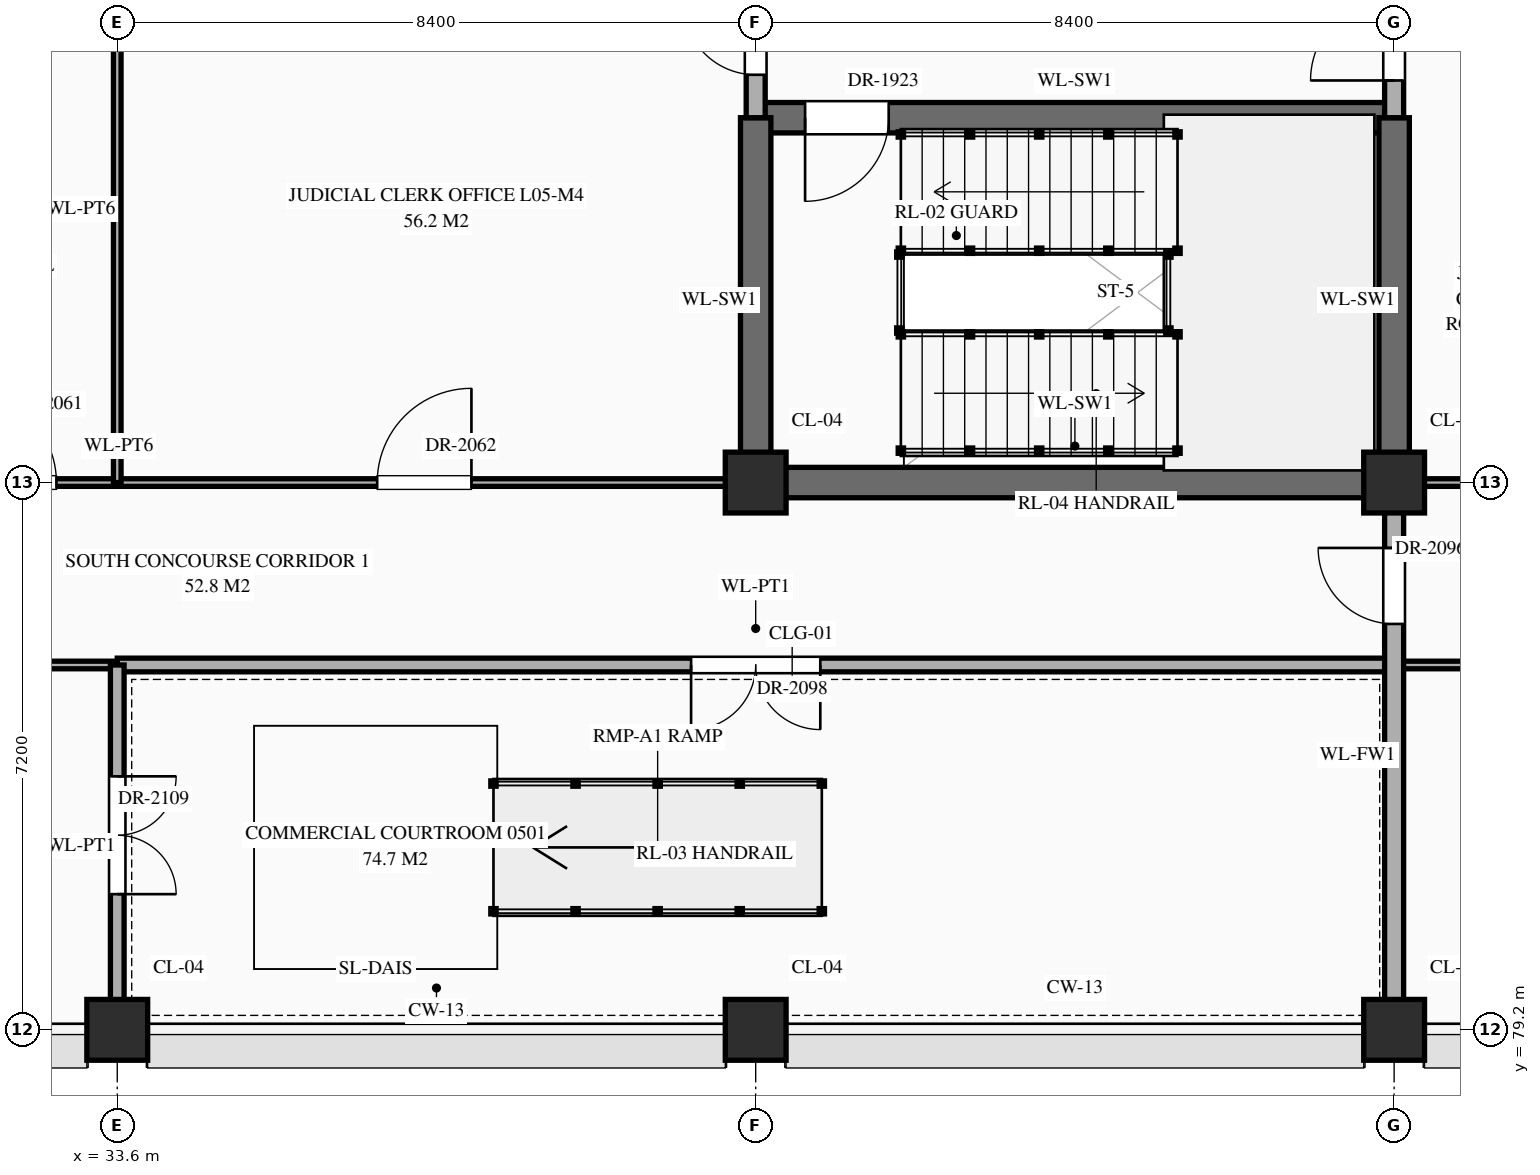
"""IFC4 building model, lengths in metres.
Left out: names, types, materials, properties, quantities, classifications, styles, units other than length and angle.
Written with IfcOpenShell. Run it as: python <this file> out.ifc"""

import sys

from ifc_helpers import new_model, si_unit, direction, frame, frame_2d, origin, origin_2d, place, context, subcontext, project, spatial, rectangle, extrude, element, fill, save


model = new_model("IFC4")
c1 = context("Model", 3, precision=1e-05, world=origin(), true_north=direction((0.0, 1.0)))
c2 = subcontext(c1, "Body", "Model", "MODEL_VIEW")
j1 = project(units=[si_unit("LENGTHUNIT", "METRE"), si_unit("PLANEANGLEUNIT", "RADIAN")], contexts=[c1])
p1 = place(None, origin())
s1 = spatial("IfcSite", under=j1, at=p1, CompositionType="ELEMENT")
p2 = place(p1, origin())
s2 = spatial("IfcBuilding", under=s1, at=p2, CompositionType="ELEMENT")
p3 = place(p2, frame((0.0, 0.0, 21.6)))
s3 = spatial("IfcBuildingStorey", under=s2, at=p3, CompositionType="ELEMENT", Elevation=21.6)
for number, where, z_axis, x_axis in (
    (1, (33.6, 79.2, 0.0), (0.0, 0.0, 1.0), (1.0, 0.0, 0.0)),
    (2, (42.0, 79.2, 0.0), (0.0, 0.0, 1.0), (1.0, 0.0, 0.0)),
    (3, (42.0, 86.4, 0.0), (0.0, 0.0, 1.0), (1.0, 0.0, 0.0)),
    (4, (50.4, 79.2, 0.0), (0.0, 0.0, 1.0), (1.0, 0.0, 0.0)),
    (5, (50.4, 86.4, 0.0), (0.0, 0.0, 1.0), (1.0, 0.0, 0.0)),
):
    element("IfcColumn", number, at=place(p3, frame(where, z_axis=z_axis, x_axis=x_axis)), inside=s3, PredefinedType="COLUMN", context=c2, shape_type="SweptSolid", body=[
        extrude(rectangle(XDim=0.8, YDim=0.8, at=origin_2d()), origin(), (0.0, 0.0, 1.0), 4.5),
    ])
p4 = place(p3, frame((25.24, 84.0, 0.0), z_axis=(0.0, 0.0, 1.0), x_axis=(1.0, 0.0, 0.0)))
e6 = element("IfcWall", 6, at=p4, inside=s3, PredefinedType="STANDARD", context=c2, shape_type="SweptSolid", body=[
    extrude(rectangle(XDim=8.36, YDim=0.1, at=frame_2d((4.18, 0.0))), origin(), (0.0, 0.0, 1.0), 4.24),
])
p5 = place(p4, frame((3.405, 0.0, 0.0)))
e7 = element("IfcOpeningElement", 7, at=p5, cuts=e6, PredefinedType="OPENING", context=c2, shape_type="SweptSolid", body=[
    extrude(rectangle(XDim=1.55, YDim=2.35, at=frame_2d((0.775, 1.175))), frame((0.0, 0.062, 0.0), z_axis=(0.0, -1.0, 0.0), x_axis=(1.0, 0.0, 0.0)), (0.0, 0.0, 1.0), 0.124),
])
p6 = place(p3, frame((33.6, 84.0, 0.0), z_axis=(0.0, 0.0, 1.0), x_axis=(1.0, 0.0, 0.0)))
e8 = element("IfcWall", 8, at=p6, inside=s3, PredefinedType="STANDARD", context=c2, shape_type="SweptSolid", body=[
    extrude(rectangle(XDim=16.8, YDim=0.18, at=frame_2d((8.4, 0.0))), origin(), (0.0, 0.0, 1.0), 4.24),
])
p7 = place(p6, frame((7.55, 0.0, 0.0)))
e9 = element("IfcOpeningElement", 9, at=p7, cuts=e8, PredefinedType="OPENING", context=c2, shape_type="SweptSolid", body=[
    extrude(rectangle(XDim=1.7, YDim=2.45, at=frame_2d((0.85, 1.225))), frame((0.0, 0.102, 0.0), z_axis=(0.0, -1.0, 0.0), x_axis=(1.0, 0.0, 0.0)), (0.0, 0.0, 1.0), 0.204),
])
p8 = place(p3, frame((50.4, 84.0, 0.0), z_axis=(0.0, 0.0, 1.0), x_axis=(1.0, 0.0, 0.0)))
e10 = element("IfcWall", 10, at=p8, inside=s3, PredefinedType="STANDARD", context=c2, shape_type="SweptSolid", body=[
    extrude(rectangle(XDim=16.8, YDim=0.1, at=frame_2d((8.4, 0.0))), origin(), (0.0, 0.0, 1.0), 4.24),
])
p9 = place(p8, frame((3.69, 0.0, 0.0)))
e11 = element("IfcOpeningElement", 11, at=p9, cuts=e10, PredefinedType="OPENING", context=c2, shape_type="SweptSolid", body=[
    extrude(rectangle(XDim=1.02, YDim=2.4, at=frame_2d((0.51, 1.2))), frame((0.0, 0.062, 0.0), z_axis=(0.0, -1.0, 0.0), x_axis=(1.0, 0.0, 0.0)), (0.0, 0.0, 1.0), 0.124),
])
p10 = place(p8, frame((12.07, 0.0, 0.0)))
e12 = element("IfcOpeningElement", 12, at=p10, cuts=e10, PredefinedType="OPENING", context=c2, shape_type="SweptSolid", body=[
    extrude(rectangle(XDim=1.06, YDim=2.4, at=frame_2d((0.53, 1.2))), frame((0.0, 0.062, 0.0), z_axis=(0.0, -1.0, 0.0), x_axis=(1.0, 0.0, 0.0)), (0.0, 0.0, 1.0), 0.124),
])
p11 = place(p3, frame((25.24, 86.4, 0.0), z_axis=(0.0, 0.0, 1.0), x_axis=(1.0, 0.0, 0.0)))
e13 = element("IfcWall", 13, at=p11, inside=s3, PredefinedType="STANDARD", context=c2, shape_type="SweptSolid", body=[
    extrude(rectangle(XDim=16.76, YDim=0.1, at=frame_2d((8.38, 0.0))), origin(), (0.0, 0.0, 1.0), 3.19),
])
p12 = place(p11, frame((0.98, 0.0, 0.0)))
e14 = element("IfcOpeningElement", 14, at=p12, cuts=e13, PredefinedType="OPENING", context=c2, shape_type="SweptSolid", body=[
    extrude(rectangle(XDim=1.08, YDim=2.25, at=frame_2d((0.54, 1.125))), frame((0.0, 0.062, 0.0), z_axis=(0.0, -1.0, 0.0), x_axis=(1.0, 0.0, 0.0)), (0.0, 0.0, 1.0), 0.124),
])
p13 = place(p11, frame((3.335, 0.0, 0.0)))
e15 = element("IfcOpeningElement", 15, at=p13, cuts=e13, PredefinedType="OPENING", context=c2, shape_type="SweptSolid", body=[
    extrude(rectangle(XDim=1.65, YDim=2.4, at=frame_2d((0.825, 1.2))), frame((0.0, 0.062, 0.0), z_axis=(0.0, -1.0, 0.0), x_axis=(1.0, 0.0, 0.0)), (0.0, 0.0, 1.0), 0.124),
])
p14 = place(p11, frame((6.36, 0.0, 0.0)))
e16 = element("IfcOpeningElement", 16, at=p14, cuts=e13, PredefinedType="OPENING", context=c2, shape_type="SweptSolid", body=[
    extrude(rectangle(XDim=1.2, YDim=2.35, at=frame_2d((0.6, 1.175))), frame((0.0, 0.062, 0.0), z_axis=(0.0, -1.0, 0.0), x_axis=(1.0, 0.0, 0.0)), (0.0, 0.0, 1.0), 0.124),
])
p15 = place(p11, frame((11.78, 0.0, 0.0)))
e17 = element("IfcOpeningElement", 17, at=p15, cuts=e13, PredefinedType="OPENING", context=c2, shape_type="SweptSolid", body=[
    extrude(rectangle(XDim=1.24, YDim=2.3, at=frame_2d((0.62, 1.15))), frame((0.0, 0.062, 0.0), z_axis=(0.0, -1.0, 0.0), x_axis=(1.0, 0.0, 0.0)), (0.0, 0.0, 1.0), 0.124),
])
p16 = place(p3, frame((42.0, 86.4, 0.0), z_axis=(0.0, 0.0, 1.0), x_axis=(1.0, 0.0, 0.0)))
e18 = element("IfcWall", 18, at=p16, inside=s3, PredefinedType="SHEAR", context=c2, shape_type="SweptSolid", body=[
    extrude(rectangle(XDim=8.4, YDim=0.4, at=frame_2d((4.2, 0.0))), origin(), (0.0, 0.0, 1.0), 4.24),
])
p17 = place(p3, frame((50.4, 86.4, 0.0), z_axis=(0.0, 0.0, 1.0), x_axis=(1.0, 0.0, 0.0)))
e19 = element("IfcWall", 19, at=p17, inside=s3, PredefinedType="STANDARD", context=c2, shape_type="SweptSolid", body=[
    extrude(rectangle(XDim=8.4, YDim=0.1, at=frame_2d((4.2, 0.0))), origin(), (0.0, 0.0, 1.0), 3.39),
])
p18 = place(p17, frame((1.09, 0.0, 0.0)))
e20 = element("IfcOpeningElement", 20, at=p18, cuts=e19, PredefinedType="OPENING", context=c2, shape_type="SweptSolid", body=[
    extrude(rectangle(XDim=0.94, YDim=2.3, at=frame_2d((0.47, 1.15))), frame((0.0, 0.062, 0.0), z_axis=(0.0, -1.0, 0.0), x_axis=(1.0, 0.0, 0.0)), (0.0, 0.0, 1.0), 0.124),
])
p19 = place(p17, frame((3.69, 0.0, 0.0)))
e21 = element("IfcOpeningElement", 21, at=p19, cuts=e19, PredefinedType="OPENING", context=c2, shape_type="SweptSolid", body=[
    extrude(rectangle(XDim=1.02, YDim=2.4, at=frame_2d((0.51, 1.2))), frame((0.0, 0.062, 0.0), z_axis=(0.0, -1.0, 0.0), x_axis=(1.0, 0.0, 0.0)), (0.0, 0.0, 1.0), 0.124),
])
p20 = place(p17, frame((6.31, 0.0, 0.0)))
e22 = element("IfcOpeningElement", 22, at=p20, cuts=e19, PredefinedType="OPENING", context=c2, shape_type="SweptSolid", body=[
    extrude(rectangle(XDim=1.06, YDim=2.4, at=frame_2d((0.53, 1.2))), frame((0.0, 0.062, 0.0), z_axis=(0.0, -1.0, 0.0), x_axis=(1.0, 0.0, 0.0)), (0.0, 0.0, 1.0), 0.124),
])
p21 = place(p3, frame((42.0, 91.2, 0.0), z_axis=(0.0, 0.0, 1.0), x_axis=(1.0, 0.0, 0.0)))
e23 = element("IfcWall", 23, at=p21, inside=s3, PredefinedType="SHEAR", context=c2, shape_type="SweptSolid", body=[
    extrude(rectangle(XDim=8.4, YDim=0.4, at=frame_2d((4.2, 0.0))), origin(), (0.0, 0.0, 1.0), 4.24),
])
p22 = place(p21, frame((0.65, 0.0, 0.0)))
e24 = element("IfcOpeningElement", 24, at=p22, cuts=e23, PredefinedType="OPENING", context=c2, shape_type="SweptSolid", body=[
    extrude(rectangle(XDim=1.1, YDim=2.2, at=frame_2d((0.55, 1.1))), frame((0.0, 0.212, 0.0), z_axis=(0.0, -1.0, 0.0), x_axis=(1.0, 0.0, 0.0)), (0.0, 0.0, 1.0), 0.424),
])
p23 = place(p3, frame((33.6, 79.24, 0.0), z_axis=(0.0, 0.0, 1.0), x_axis=(0.0, 1.0, 0.0)))
e25 = element("IfcWall", 25, at=p23, inside=s3, PredefinedType="STANDARD", context=c2, shape_type="SweptSolid", body=[
    extrude(rectangle(XDim=4.76, YDim=0.18, at=frame_2d((2.38, 0.0))), origin(), (0.0, 0.0, 1.0), 4.24),
])
p24 = place(p23, frame((1.745, 0.0, 0.0)))
e26 = element("IfcOpeningElement", 26, at=p24, cuts=e25, PredefinedType="OPENING", context=c2, shape_type="SweptSolid", body=[
    extrude(rectangle(XDim=1.55, YDim=2.35, at=frame_2d((0.775, 1.175))), frame((0.0, 0.102, 0.0), z_axis=(0.0, -1.0, 0.0), x_axis=(1.0, 0.0, 0.0)), (0.0, 0.0, 1.0), 0.204),
])
p25 = place(p3, frame((33.6, 86.4, 0.0), z_axis=(0.0, 0.0, 1.0), x_axis=(0.0, 1.0, 0.0)))
e27 = element("IfcWall", 27, at=p25, inside=s3, PredefinedType="STANDARD", context=c2, shape_type="SweptSolid", body=[
    extrude(rectangle(XDim=7.2, YDim=0.1, at=frame_2d((3.6, 0.0))), origin(), (0.0, 0.0, 1.0), 4.24),
])
p26 = place(p3, frame((42.0, 86.4, 0.0), z_axis=(0.0, 0.0, 1.0), x_axis=(0.0, 1.0, 0.0)))
e28 = element("IfcWall", 28, at=p26, inside=s3, PredefinedType="SHEAR", context=c2, shape_type="SweptSolid", body=[
    extrude(rectangle(XDim=4.8, YDim=0.4, at=frame_2d((2.4, 0.0))), origin(), (0.0, 0.0, 1.0), 4.24),
])
p27 = place(p3, frame((42.0, 91.2, 0.0), z_axis=(0.0, 0.0, 1.0), x_axis=(0.0, 1.0, 0.0)))
e29 = element("IfcWall", 29, at=p27, inside=s3, PredefinedType="STANDARD", context=c2, shape_type="SweptSolid", body=[
    extrude(rectangle(XDim=2.4, YDim=0.25, at=frame_2d((1.2, 0.0))), origin(), (0.0, 0.0, 1.0), 3.49),
])
p28 = place(p27, frame((0.565, 0.0, 0.0)))
e30 = element("IfcOpeningElement", 30, at=p28, cuts=e29, PredefinedType="OPENING", context=c2, shape_type="SweptSolid", body=[
    extrude(rectangle(XDim=0.95, YDim=2.15, at=frame_2d((0.475, 1.075))), frame((0.0, 0.137, 0.0), z_axis=(0.0, -1.0, 0.0), x_axis=(1.0, 0.0, 0.0)), (0.0, 0.0, 1.0), 0.274),
])
p29 = place(p3, frame((50.4, 79.24, 0.0), z_axis=(0.0, 0.0, 1.0), x_axis=(0.0, 1.0, 0.0)))
e31 = element("IfcWall", 31, at=p29, inside=s3, PredefinedType="STANDARD", context=c2, shape_type="SweptSolid", body=[
    extrude(rectangle(XDim=7.16, YDim=0.25, at=frame_2d((3.58, 0.0))), origin(), (0.0, 0.0, 1.0), 3.49),
])
p30 = place(p29, frame((5.3, 0.0, 0.0)))
e32 = element("IfcOpeningElement", 32, at=p30, cuts=e31, PredefinedType="OPENING", context=c2, shape_type="SweptSolid", body=[
    extrude(rectangle(XDim=1.0, YDim=2.2, at=frame_2d((0.5, 1.1))), frame((0.0, 0.137, 0.0), z_axis=(0.0, -1.0, 0.0), x_axis=(1.0, 0.0, 0.0)), (0.0, 0.0, 1.0), 0.274),
])
p31 = place(p3, frame((50.4, 86.4, 0.0), z_axis=(0.0, 0.0, 1.0), x_axis=(0.0, 1.0, 0.0)))
e33 = element("IfcWall", 33, at=p31, inside=s3, PredefinedType="SHEAR", context=c2, shape_type="SweptSolid", body=[
    extrude(rectangle(XDim=4.8, YDim=0.4, at=frame_2d((2.4, 0.0))), origin(), (0.0, 0.0, 1.0), 4.24),
])
p32 = place(p3, frame((50.4, 91.2, 0.0), z_axis=(0.0, 0.0, 1.0), x_axis=(0.0, 1.0, 0.0)))
e34 = element("IfcWall", 34, at=p32, inside=s3, PredefinedType="STANDARD", context=c2, shape_type="SweptSolid", body=[
    extrude(rectangle(XDim=13.2, YDim=0.25, at=frame_2d((6.6, 0.0))), origin(), (0.0, 0.0, 1.0), 3.49),
])
p33 = place(p32, frame((0.49, 0.0, 0.0)))
e35 = element("IfcOpeningElement", 35, at=p33, cuts=e34, PredefinedType="OPENING", context=c2, shape_type="SweptSolid", body=[
    extrude(rectangle(XDim=1.1, YDim=2.2, at=frame_2d((0.55, 1.1))), frame((0.0, 0.137, 0.0), z_axis=(0.0, -1.0, 0.0), x_axis=(1.0, 0.0, 0.0)), (0.0, 0.0, 1.0), 0.274),
])
p34 = place(p32, frame((10.485, 0.0, 0.0)))
e36 = element("IfcOpeningElement", 36, at=p34, cuts=e34, PredefinedType="OPENING", context=c2, shape_type="SweptSolid", body=[
    extrude(rectangle(XDim=0.95, YDim=2.15, at=frame_2d((0.475, 1.075))), frame((0.0, 0.137, 0.0), z_axis=(0.0, -1.0, 0.0), x_axis=(1.0, 0.0, 0.0)), (0.0, 0.0, 1.0), 0.274),
])
p35 = place(p32, frame((3.26, 0.0, 0.0)))
e37 = element("IfcOpeningElement", 37, at=p35, cuts=e34, PredefinedType="OPENING", context=c2, shape_type="SweptSolid", body=[
    extrude(rectangle(XDim=1.0, YDim=2.2, at=frame_2d((0.5, 1.1))), frame((0.0, 0.137, 0.0), z_axis=(0.0, -1.0, 0.0), x_axis=(1.0, 0.0, 0.0)), (0.0, 0.0, 1.0), 0.274),
])
p36 = place(p22, frame((1.1, 0.0, 0.0), z_axis=(0.0, 0.0, 1.0), x_axis=(-1.0, 0.0, 0.0)))
e38 = element("IfcDoor", 38, at=p36, inside=s3, OperationType="SINGLE_SWING_RIGHT", PredefinedType="DOOR", context=c2, shape_type="SweptSolid", body=[
    extrude(rectangle(XDim=1.1, YDim=2.2, at=frame_2d((0.55, 1.1))), frame((0.0, 0.025, 0.0), z_axis=(0.0, -1.0, 0.0), x_axis=(1.0, 0.0, 0.0)), (0.0, 0.0, 1.0), 0.05),
])
fill(e24, e38)
p37 = place(p28, origin())
e39 = element("IfcDoor", 39, at=p37, inside=s3, OperationType="SINGLE_SWING_RIGHT", PredefinedType="DOOR", context=c2, shape_type="SweptSolid", body=[
    extrude(rectangle(XDim=0.95, YDim=2.15, at=frame_2d((0.475, 1.075))), frame((0.0, 0.025, 0.0), z_axis=(0.0, -1.0, 0.0), x_axis=(1.0, 0.0, 0.0)), (0.0, 0.0, 1.0), 0.05),
])
fill(e30, e39)
p38 = place(p33, origin())
e40 = element("IfcDoor", 40, at=p38, inside=s3, OperationType="SINGLE_SWING_LEFT", PredefinedType="DOOR", context=c2, shape_type="SweptSolid", body=[
    extrude(rectangle(XDim=1.1, YDim=2.2, at=frame_2d((0.55, 1.1))), frame((0.0, 0.025, 0.0), z_axis=(0.0, -1.0, 0.0), x_axis=(1.0, 0.0, 0.0)), (0.0, 0.0, 1.0), 0.05),
])
fill(e35, e40)
p39 = place(p14, origin())
e41 = element("IfcDoor", 41, at=p39, inside=s3, OperationType="SINGLE_SWING_LEFT", PredefinedType="DOOR", context=c2, shape_type="SweptSolid", body=[
    extrude(rectangle(XDim=1.2, YDim=2.35, at=frame_2d((0.6, 1.175))), frame((0.0, 0.025, 0.0), z_axis=(0.0, -1.0, 0.0), x_axis=(1.0, 0.0, 0.0)), (0.0, 0.0, 1.0), 0.05),
])
fill(e16, e41)
p40 = place(p15, origin())
e42 = element("IfcDoor", 42, at=p40, inside=s3, OperationType="SINGLE_SWING_RIGHT", PredefinedType="DOOR", context=c2, shape_type="SweptSolid", body=[
    extrude(rectangle(XDim=1.24, YDim=2.3, at=frame_2d((0.62, 1.15))), frame((0.0, 0.025, 0.0), z_axis=(0.0, -1.0, 0.0), x_axis=(1.0, 0.0, 0.0)), (0.0, 0.0, 1.0), 0.05),
])
fill(e17, e42)
p41 = place(p30, origin())
e43 = element("IfcDoor", 43, at=p41, inside=s3, OperationType="SINGLE_SWING_RIGHT", PredefinedType="DOOR", context=c2, shape_type="SweptSolid", body=[
    extrude(rectangle(XDim=1.0, YDim=2.2, at=frame_2d((0.5, 1.1))), frame((0.0, 0.025, 0.0), z_axis=(0.0, -1.0, 0.0), x_axis=(1.0, 0.0, 0.0)), (0.0, 0.0, 1.0), 0.05),
])
fill(e32, e43)
p42 = place(p7, frame((1.7, 0.0, 0.0), z_axis=(0.0, 0.0, 1.0), x_axis=(-1.0, 0.0, 0.0)))
e44 = element("IfcDoor", 44, at=p42, inside=s3, OperationType="DOUBLE_DOOR_SINGLE_SWING", PredefinedType="DOOR", context=c2, shape_type="SweptSolid", body=[
    extrude(rectangle(XDim=1.7, YDim=2.45, at=frame_2d((0.85, 1.225))), frame((0.0, 0.025, 0.0), z_axis=(0.0, -1.0, 0.0), x_axis=(1.0, 0.0, 0.0)), (0.0, 0.0, 1.0), 0.05),
])
fill(e9, e44)
p43 = place(p24, frame((1.55, 0.0, 0.0), z_axis=(0.0, 0.0, 1.0), x_axis=(-1.0, 0.0, 0.0)))
e45 = element("IfcDoor", 45, at=p43, inside=s3, OperationType="DOUBLE_DOOR_SINGLE_SWING", PredefinedType="DOOR", context=c2, shape_type="SweptSolid", body=[
    extrude(rectangle(XDim=1.55, YDim=2.35, at=frame_2d((0.775, 1.175))), frame((0.0, 0.025, 0.0), z_axis=(0.0, -1.0, 0.0), x_axis=(1.0, 0.0, 0.0)), (0.0, 0.0, 1.0), 0.05),
])
fill(e26, e45)
save(model, sys.argv[1])
